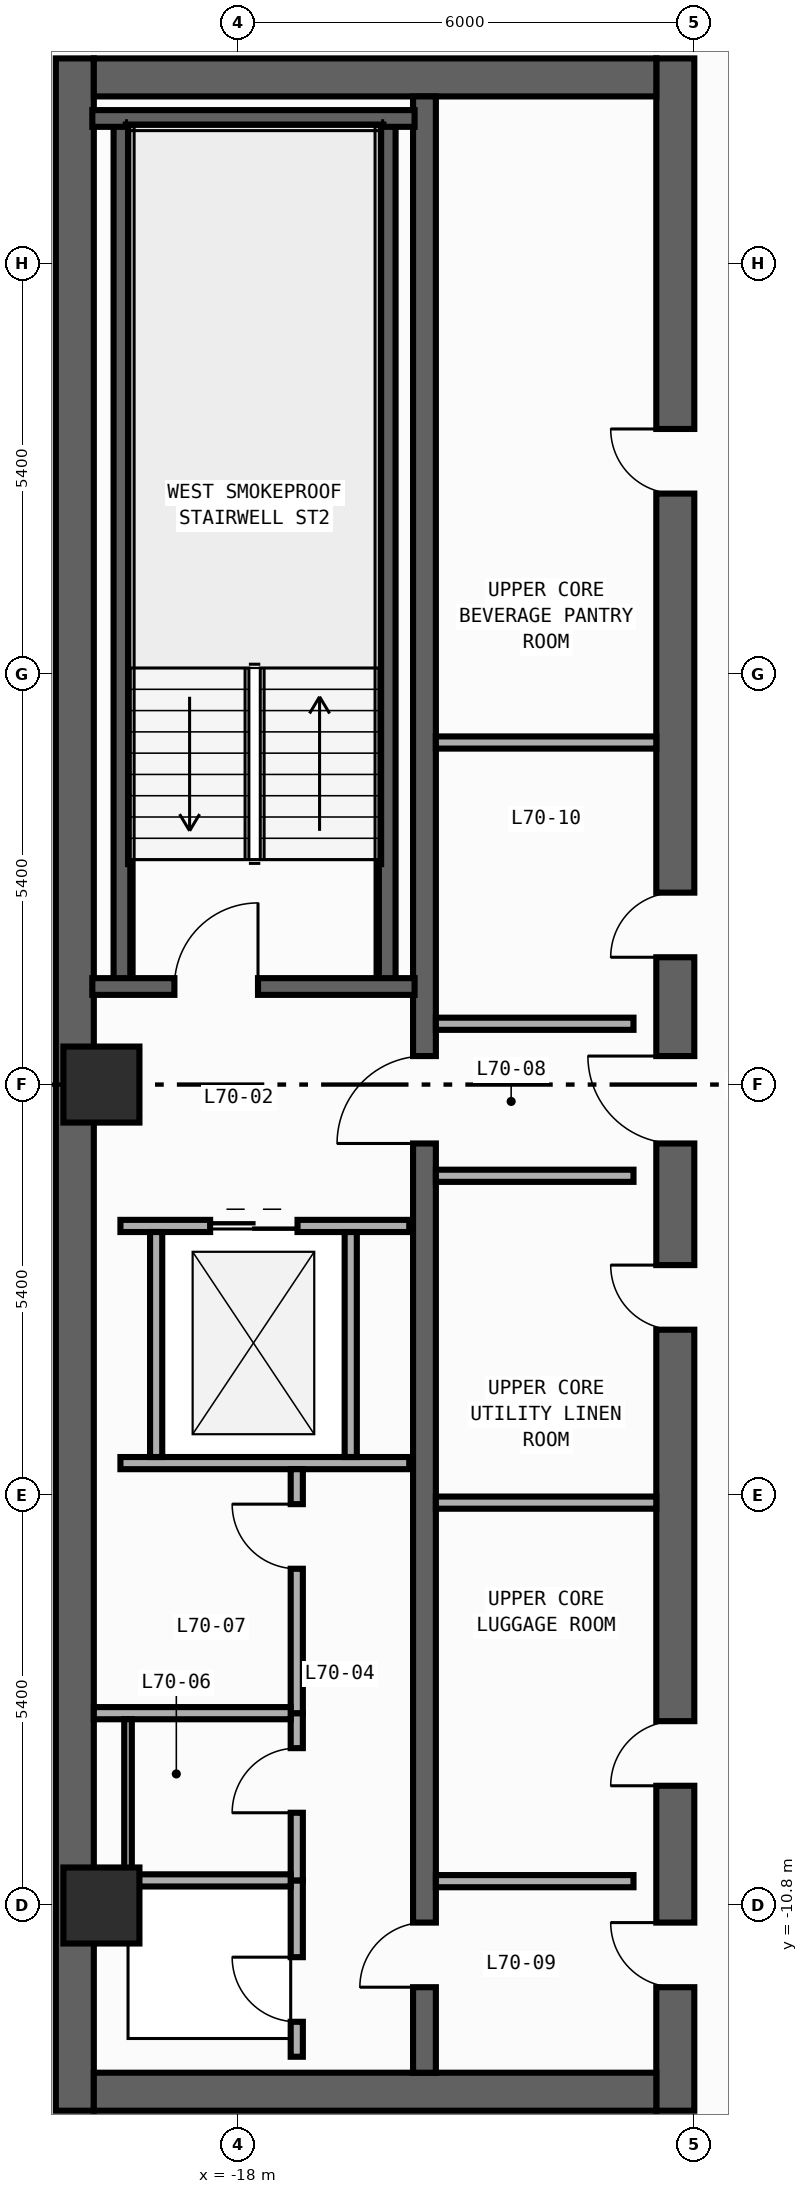
"""IFC4 building model, lengths in metres.
Left out: names, types, materials, properties, quantities, classifications, styles, units other than length and angle.
Written with IfcOpenShell. Run it as: python <this file> out.ifc"""

import sys

from ifc_helpers import new_model, si_unit, direction, frame, frame_2d, origin, origin_2d, place, context, subcontext, project, spatial, rectangle, circle, extrude, element, fill, save


model = new_model("IFC4")
c1 = context("Model", 3, precision=1e-05, world=origin(), true_north=direction((0.0, 1.0)))
c2 = subcontext(c1, "Body", "Model", "MODEL_VIEW")
j1 = project(units=[si_unit("LENGTHUNIT", "METRE"), si_unit("PLANEANGLEUNIT", "RADIAN")], contexts=[c1])
p1 = place(None, origin())
s1 = spatial("IfcSite", under=j1, at=p1, CompositionType="ELEMENT")
p2 = place(p1, origin())
s2 = spatial("IfcBuilding", under=s1, at=p2, CompositionType="ELEMENT")
p3 = place(p2, frame((0.0, 0.0, 292.8)))
s3 = spatial("IfcBuildingStorey", under=s2, at=p3, CompositionType="ELEMENT", Elevation=292.8)
p4 = place(p3, frame((-20.15, -13.5, 0.0), z_axis=(0.0, 0.0, 1.0), x_axis=(0.0, 1.0, 0.0)))
e1 = element("IfcWall", 1, at=p4, inside=s3, PredefinedType="SHEAR", context=c2, shape_type="SweptSolid", body=[
    extrude(rectangle(XDim=27.0, YDim=0.5, at=frame_2d((13.5, 0.0))), origin(), (0.0, 0.0, 1.0), 3.54),
])
p5 = place(p3, frame((-12.25, -13.5, 0.0), z_axis=(0.0, 0.0, 1.0), x_axis=(0.0, 1.0, 0.0)))
e2 = element("IfcWall", 2, at=p5, inside=s3, PredefinedType="SHEAR", context=c2, shape_type="SweptSolid", body=[
    extrude(rectangle(XDim=27.0, YDim=0.5, at=frame_2d((13.5, 0.0))), origin(), (0.0, 0.0, 1.0), 3.54),
])
p6 = place(p5, frame((15.175, 0.0, 0.0)))
e3 = element("IfcOpeningElement", 3, at=p6, cuts=e2, PredefinedType="OPENING", context=c2, shape_type="SweptSolid", body=[
    extrude(rectangle(XDim=0.85, YDim=2.1, at=frame_2d((0.425, 1.05))), frame((0.0, 0.26, 0.0), z_axis=(0.0, -1.0, 0.0), x_axis=(1.0, 0.0, 0.0)), (0.0, 0.0, 1.0), 0.52),
])
p7 = place(p5, frame((21.275, 0.0, 0.0)))
e4 = element("IfcOpeningElement", 4, at=p7, cuts=e2, PredefinedType="OPENING", context=c2, shape_type="SweptSolid", body=[
    extrude(rectangle(XDim=0.85, YDim=2.1, at=frame_2d((0.425, 1.05))), frame((0.0, 0.26, 0.0), z_axis=(0.0, -1.0, 0.0), x_axis=(1.0, 0.0, 0.0)), (0.0, 0.0, 1.0), 0.52),
])
p8 = place(p5, frame((4.275, 0.0, 0.0)))
e5 = element("IfcOpeningElement", 5, at=p8, cuts=e2, PredefinedType="OPENING", context=c2, shape_type="SweptSolid", body=[
    extrude(rectangle(XDim=0.85, YDim=2.1, at=frame_2d((0.425, 1.05))), frame((0.0, 0.26, 0.0), z_axis=(0.0, -1.0, 0.0), x_axis=(1.0, 0.0, 0.0)), (0.0, 0.0, 1.0), 0.52),
])
p9 = place(p5, frame((10.275, 0.0, 0.0)))
e6 = element("IfcOpeningElement", 6, at=p9, cuts=e2, PredefinedType="OPENING", context=c2, shape_type="SweptSolid", body=[
    extrude(rectangle(XDim=0.85, YDim=2.1, at=frame_2d((0.425, 1.05))), frame((0.0, 0.26, 0.0), z_axis=(0.0, -1.0, 0.0), x_axis=(1.0, 0.0, 0.0)), (0.0, 0.0, 1.0), 0.52),
])
p10 = place(p5, frame((12.725, 0.0, 0.0)))
e7 = element("IfcOpeningElement", 7, at=p10, cuts=e2, PredefinedType="OPENING", context=c2, shape_type="SweptSolid", body=[
    extrude(rectangle(XDim=1.15, YDim=2.2, at=frame_2d((0.575, 1.1))), frame((0.0, 0.26, 0.0), z_axis=(0.0, -1.0, 0.0), x_axis=(1.0, 0.0, 0.0)), (0.0, 0.0, 1.0), 0.52),
])
p11 = place(p5, frame((1.625, 0.0, 0.0)))
e8 = element("IfcOpeningElement", 8, at=p11, cuts=e2, PredefinedType="OPENING", context=c2, shape_type="SweptSolid", body=[
    extrude(rectangle(XDim=0.85, YDim=2.1, at=frame_2d((0.425, 1.05))), frame((0.0, 0.26, 0.0), z_axis=(0.0, -1.0, 0.0), x_axis=(1.0, 0.0, 0.0)), (0.0, 0.0, 1.0), 0.52),
])
for number, where, z_axis, x_axis in (
    (9, (-19.9, -13.25, 0.0), (0.0, 0.0, 1.0), (1.0, 0.0, 0.0)),
    (10, (-19.9, 13.25, 0.0), (0.0, 0.0, 1.0), (1.0, 0.0, 0.0)),
):
    element("IfcWall", number, at=place(p3, frame(where, z_axis=z_axis, x_axis=x_axis)), inside=s3, PredefinedType="SHEAR", context=c2, shape_type="SweptSolid", body=[
        extrude(rectangle(XDim=7.4, YDim=0.5, at=frame_2d((3.7, 0.0))), origin(), (0.0, 0.0, 1.0), 3.54),
    ])
p12 = place(p3, frame((-15.55, -13.0, 0.0), z_axis=(0.0, 0.0, 1.0), x_axis=(0.0, 1.0, 0.0)))
e11 = element("IfcWall", 11, at=p12, inside=s3, PredefinedType="SHEAR", context=c2, shape_type="SweptSolid", body=[
    extrude(rectangle(XDim=26.0, YDim=0.3, at=frame_2d((13.0, 0.0))), origin(), (0.0, 0.0, 1.0), 3.54),
])
p13 = place(p12, frame((12.225, 0.0, 0.0)))
e12 = element("IfcOpeningElement", 12, at=p13, cuts=e11, PredefinedType="OPENING", context=c2, shape_type="SweptSolid", body=[
    extrude(rectangle(XDim=1.15, YDim=2.2, at=frame_2d((0.575, 1.1))), frame((0.0, 0.16, 0.0), z_axis=(0.0, -1.0, 0.0), x_axis=(1.0, 0.0, 0.0)), (0.0, 0.0, 1.0), 0.32),
])
p14 = place(p12, frame((1.125, 0.0, 0.0)))
e13 = element("IfcOpeningElement", 13, at=p14, cuts=e11, PredefinedType="OPENING", context=c2, shape_type="SweptSolid", body=[
    extrude(rectangle(XDim=0.85, YDim=2.1, at=frame_2d((0.425, 1.05))), frame((0.0, 0.16, 0.0), z_axis=(0.0, -1.0, 0.0), x_axis=(1.0, 0.0, 0.0)), (0.0, 0.0, 1.0), 0.32),
])
for number, where, z_axis, x_axis in (
    (14, (-16.04, 1.29, 0.0), (0.0, 0.0, 1.0), (0.0, 1.0, 0.0)),
    (15, (-19.53, 1.29, 0.0), (0.0, 0.0, 1.0), (0.0, 1.0, 0.0)),
):
    element("IfcWall", number, at=place(p3, frame(where, z_axis=z_axis, x_axis=x_axis)), inside=s3, PredefinedType="SHEAR", context=c2, shape_type="SweptSolid", body=[
        extrude(rectangle(XDim=11.42, YDim=0.22, at=frame_2d((5.71, 0.0))), origin(), (0.0, 0.0, 1.0), 3.54),
    ])
p15 = place(p3, frame((-19.92, 12.71, 0.0), z_axis=(0.0, 0.0, 1.0), x_axis=(1.0, 0.0, 0.0)))
e16 = element("IfcWall", 16, at=p15, inside=s3, PredefinedType="SHEAR", context=c2, shape_type="SweptSolid", body=[
    extrude(rectangle(XDim=4.24, YDim=0.22, at=frame_2d((2.12, 0.0))), origin(), (0.0, 0.0, 1.0), 3.54),
])
p16 = place(p3, frame((-19.92, 1.29, 0.0), z_axis=(0.0, 0.0, 1.0), x_axis=(1.0, 0.0, 0.0)))
e17 = element("IfcWall", 17, at=p16, inside=s3, PredefinedType="SHEAR", context=c2, shape_type="SweptSolid", body=[
    extrude(rectangle(XDim=4.24, YDim=0.22, at=frame_2d((2.12, 0.0))), origin(), (0.0, 0.0, 1.0), 3.54),
])
p17 = place(p16, frame((1.08, 0.0, 0.0)))
e18 = element("IfcOpeningElement", 18, at=p17, cuts=e17, PredefinedType="OPENING", context=c2, shape_type="SweptSolid", body=[
    extrude(rectangle(XDim=1.1, YDim=2.2, at=frame_2d((0.55, 1.1))), frame((0.0, 0.12, 0.0), z_axis=(0.0, -1.0, 0.0), x_axis=(1.0, 0.0, 0.0)), (0.0, 0.0, 1.0), 0.24),
])
for number, where, z_axis, x_axis in (
    (19, (-19.8, -10.8, 0.0), (0.0, 0.0, 1.0), (1.0, 0.0, 0.0)),
    (20, (-19.8, 0.0, 0.0), (0.0, 0.0, 1.0), (1.0, 0.0, 0.0)),
):
    element("IfcColumn", number, at=place(p3, frame(where, z_axis=z_axis, x_axis=x_axis)), inside=s3, PredefinedType="COLUMN", context=c2, shape_type="SweptSolid", body=[
        extrude(circle(Radius=0.5, at=origin_2d()), origin(), (0.0, 0.0, 1.0), 3.8),
    ])
p18 = place(p3, frame((-19.55, -1.86, 0.0), z_axis=(0.0, 0.0, 1.0), x_axis=(1.0, 0.0, 0.0)))
e21 = element("IfcWall", 21, at=p18, inside=s3, PredefinedType="STANDARD", context=c2, shape_type="SweptSolid", body=[
    extrude(rectangle(XDim=3.8, YDim=0.16, at=frame_2d((1.9, 0.0))), origin(), (0.0, 0.0, 1.0), 3.54),
])
p19 = place(p18, frame((1.18, 0.0, 0.0)))
e22 = element("IfcOpeningElement", 22, at=p19, cuts=e21, PredefinedType="OPENING", context=c2, shape_type="SweptSolid", body=[
    extrude(rectangle(XDim=1.15, YDim=2.2, at=frame_2d((0.575, 1.1))), frame((0.0, 0.09, 0.0), z_axis=(0.0, -1.0, 0.0), x_axis=(1.0, 0.0, 0.0)), (0.0, 0.0, 1.0), 0.18),
])
p20 = place(p3, frame((-19.55, -4.98, 0.0), z_axis=(0.0, 0.0, 1.0), x_axis=(1.0, 0.0, 0.0)))
e23 = element("IfcWall", 23, at=p20, inside=s3, PredefinedType="STANDARD", context=c2, shape_type="SweptSolid", body=[
    extrude(rectangle(XDim=3.8, YDim=0.16, at=frame_2d((1.9, 0.0))), origin(), (0.0, 0.0, 1.0), 3.54),
])
for number, where, z_axis, x_axis in (
    (24, (-19.08, -4.9, 0.0), (0.0, 0.0, 1.0), (0.0, 1.0, 0.0)),
    (25, (-16.52, -4.9, 0.0), (0.0, 0.0, 1.0), (0.0, 1.0, 0.0)),
):
    element("IfcWall", number, at=place(p3, frame(where, z_axis=z_axis, x_axis=x_axis)), inside=s3, PredefinedType="STANDARD", context=c2, shape_type="SweptSolid", body=[
        extrude(rectangle(XDim=2.96, YDim=0.16, at=frame_2d((1.48, 0.0))), origin(), (0.0, 0.0, 1.0), 3.54),
    ])
for number, where, z_axis, x_axis in (
    (26, (-15.4, 0.8, 0.0), (0.0, 0.0, 1.0), (1.0, 0.0, 0.0)),
    (27, (-15.4, -1.2, 0.0), (0.0, 0.0, 1.0), (1.0, 0.0, 0.0)),
    (28, (-15.4, -10.48, 0.0), (0.0, 0.0, 1.0), (1.0, 0.0, 0.0)),
):
    element("IfcWall", number, at=place(p3, frame(where, z_axis=z_axis, x_axis=x_axis)), inside=s3, PredefinedType="STANDARD", context=c2, shape_type="SweptSolid", body=[
        extrude(rectangle(XDim=2.6, YDim=0.16, at=frame_2d((1.3, 0.0))), origin(), (0.0, 0.0, 1.0), 3.54),
    ])
p21 = place(p3, frame((-17.23, -12.79, 0.0), z_axis=(0.0, 0.0, 1.0), x_axis=(0.0, 1.0, 0.0)))
e29 = element("IfcWall", 29, at=p21, inside=s3, PredefinedType="PARTITIONING", context=c2, shape_type="SweptSolid", body=[
    extrude(rectangle(XDim=2.32, YDim=0.16, at=frame_2d((1.16, 0.0))), origin(), (0.0, 0.0, 1.0), 3.54),
])
p22 = place(p21, frame((0.46, 0.0, 0.0)))
e30 = element("IfcOpeningElement", 30, at=p22, cuts=e29, PredefinedType="OPENING", context=c2, shape_type="SweptSolid", body=[
    extrude(rectangle(XDim=0.85, YDim=2.1, at=frame_2d((0.425, 1.05))), frame((0.0, 0.09, 0.0), z_axis=(0.0, -1.0, 0.0), x_axis=(1.0, 0.0, 0.0)), (0.0, 0.0, 1.0), 0.18),
])
p23 = place(p3, frame((-17.23, -10.47, 0.0), z_axis=(0.0, 0.0, 1.0), x_axis=(0.0, 1.0, 0.0)))
e31 = element("IfcWall", 31, at=p23, inside=s3, PredefinedType="PARTITIONING", context=c2, shape_type="SweptSolid", body=[
    extrude(rectangle(XDim=2.2, YDim=0.16, at=frame_2d((1.1, 0.0))), origin(), (0.0, 0.0, 1.0), 3.54),
])
p24 = place(p23, frame((0.89, 0.0, 0.0)))
e32 = element("IfcOpeningElement", 32, at=p24, cuts=e31, PredefinedType="OPENING", context=c2, shape_type="SweptSolid", body=[
    extrude(rectangle(XDim=0.85, YDim=2.1, at=frame_2d((0.425, 1.05))), frame((0.0, 0.09, 0.0), z_axis=(0.0, -1.0, 0.0), x_axis=(1.0, 0.0, 0.0)), (0.0, 0.0, 1.0), 0.18),
])
p25 = place(p3, frame((-17.23, -8.27, 0.0), z_axis=(0.0, 0.0, 1.0), x_axis=(0.0, 1.0, 0.0)))
e33 = element("IfcWall", 33, at=p25, inside=s3, PredefinedType="PARTITIONING", context=c2, shape_type="SweptSolid", body=[
    extrude(rectangle(XDim=3.21, YDim=0.16, at=frame_2d((1.605, 0.0))), origin(), (0.0, 0.0, 1.0), 3.54),
])
p26 = place(p25, frame((1.9, 0.0, 0.0)))
e34 = element("IfcOpeningElement", 34, at=p26, cuts=e33, PredefinedType="OPENING", context=c2, shape_type="SweptSolid", body=[
    extrude(rectangle(XDim=0.85, YDim=2.1, at=frame_2d((0.425, 1.05))), frame((0.0, 0.09, 0.0), z_axis=(0.0, -1.0, 0.0), x_axis=(1.0, 0.0, 0.0)), (0.0, 0.0, 1.0), 0.18),
])
p27 = place(p3, frame((-19.75, -10.47, 0.0), z_axis=(0.0, 0.0, 1.0), x_axis=(1.0, 0.0, 0.0)))
e35 = element("IfcWall", 35, at=p27, inside=s3, PredefinedType="PARTITIONING", context=c2, shape_type="SweptSolid", body=[
    extrude(rectangle(XDim=2.44, YDim=0.16, at=frame_2d((1.22, 0.0))), origin(), (0.0, 0.0, 1.0), 3.54),
])
p28 = place(p3, frame((-19.9, -8.27, 0.0), z_axis=(0.0, 0.0, 1.0), x_axis=(1.0, 0.0, 0.0)))
e36 = element("IfcWall", 36, at=p28, inside=s3, PredefinedType="PARTITIONING", context=c2, shape_type="SweptSolid", body=[
    extrude(rectangle(XDim=2.59, YDim=0.16, at=frame_2d((1.295, 0.0))), origin(), (0.0, 0.0, 1.0), 3.54),
])
for number, where, z_axis, x_axis in (
    (37, (-15.4, 4.5, 0.0), (0.0, 0.0, 1.0), (1.0, 0.0, 0.0)),
    (38, (-15.4, -5.5, 0.0), (0.0, 0.0, 1.0), (1.0, 0.0, 0.0)),
):
    element("IfcWall", number, at=place(p3, frame(where, z_axis=z_axis, x_axis=x_axis)), inside=s3, PredefinedType="PARTITIONING", context=c2, shape_type="SweptSolid", body=[
        extrude(rectangle(XDim=2.9, YDim=0.16, at=frame_2d((1.45, 0.0))), origin(), (0.0, 0.0, 1.0), 3.54),
    ])
p29 = place(p3, frame((-19.45, -10.39, 0.0), z_axis=(0.0, 0.0, 1.0), x_axis=(0.0, 1.0, 0.0)))
e39 = element("IfcWall", 39, at=p29, inside=s3, PredefinedType="PARTITIONING", context=c2, shape_type="SweptSolid", body=[
    extrude(rectangle(XDim=2.04, YDim=0.1, at=frame_2d((1.02, 0.0))), origin(), (0.0, 0.0, 1.0), 3.54),
])
p30 = place(p17, origin())
e40 = element("IfcDoor", 40, at=p30, inside=s3, OperationType="SINGLE_SWING_RIGHT", PredefinedType="DOOR", context=c2, shape_type="SweptSolid", body=[
    extrude(rectangle(XDim=1.1, YDim=2.2, at=frame_2d((0.55, 1.1))), frame((0.0, 0.025, 0.0), z_axis=(0.0, -1.0, 0.0), x_axis=(1.0, 0.0, 0.0)), (0.0, 0.0, 1.0), 0.05),
])
fill(e18, e40)
p31 = place(p6, origin())
e41 = element("IfcDoor", 41, at=p31, inside=s3, OperationType="SINGLE_SWING_LEFT", PredefinedType="DOOR", context=c2, shape_type="SweptSolid", body=[
    extrude(rectangle(XDim=0.85, YDim=2.1, at=frame_2d((0.425, 1.05))), frame((0.0, 0.025, 0.0), z_axis=(0.0, -1.0, 0.0), x_axis=(1.0, 0.0, 0.0)), (0.0, 0.0, 1.0), 0.05),
])
fill(e3, e41)
p32 = place(p7, origin())
e42 = element("IfcDoor", 42, at=p32, inside=s3, OperationType="SINGLE_SWING_RIGHT", PredefinedType="DOOR", context=c2, shape_type="SweptSolid", body=[
    extrude(rectangle(XDim=0.85, YDim=2.1, at=frame_2d((0.425, 1.05))), frame((0.0, 0.025, 0.0), z_axis=(0.0, -1.0, 0.0), x_axis=(1.0, 0.0, 0.0)), (0.0, 0.0, 1.0), 0.05),
])
fill(e4, e42)
p33 = place(p8, origin())
e43 = element("IfcDoor", 43, at=p33, inside=s3, OperationType="SINGLE_SWING_LEFT", PredefinedType="DOOR", context=c2, shape_type="SweptSolid", body=[
    extrude(rectangle(XDim=0.85, YDim=2.1, at=frame_2d((0.425, 1.05))), frame((0.0, 0.025, 0.0), z_axis=(0.0, -1.0, 0.0), x_axis=(1.0, 0.0, 0.0)), (0.0, 0.0, 1.0), 0.05),
])
fill(e5, e43)
p34 = place(p9, origin())
e44 = element("IfcDoor", 44, at=p34, inside=s3, OperationType="SINGLE_SWING_RIGHT", PredefinedType="DOOR", context=c2, shape_type="SweptSolid", body=[
    extrude(rectangle(XDim=0.85, YDim=2.1, at=frame_2d((0.425, 1.05))), frame((0.0, 0.025, 0.0), z_axis=(0.0, -1.0, 0.0), x_axis=(1.0, 0.0, 0.0)), (0.0, 0.0, 1.0), 0.05),
])
fill(e6, e44)
p35 = place(p10, origin())
e45 = element("IfcDoor", 45, at=p35, inside=s3, OperationType="SINGLE_SWING_RIGHT", PredefinedType="DOOR", context=c2, shape_type="SweptSolid", body=[
    extrude(rectangle(XDim=1.15, YDim=2.2, at=frame_2d((0.575, 1.1))), frame((0.0, 0.025, 0.0), z_axis=(0.0, -1.0, 0.0), x_axis=(1.0, 0.0, 0.0)), (0.0, 0.0, 1.0), 0.05),
])
fill(e7, e45)
p36 = place(p13, origin())
e46 = element("IfcDoor", 46, at=p36, inside=s3, OperationType="SINGLE_SWING_LEFT", PredefinedType="DOOR", context=c2, shape_type="SweptSolid", body=[
    extrude(rectangle(XDim=1.15, YDim=2.2, at=frame_2d((0.575, 1.1))), frame((0.0, 0.025, 0.0), z_axis=(0.0, -1.0, 0.0), x_axis=(1.0, 0.0, 0.0)), (0.0, 0.0, 1.0), 0.05),
])
fill(e12, e46)
p37 = place(p11, origin())
e47 = element("IfcDoor", 47, at=p37, inside=s3, OperationType="SINGLE_SWING_RIGHT", PredefinedType="DOOR", context=c2, shape_type="SweptSolid", body=[
    extrude(rectangle(XDim=0.85, YDim=2.1, at=frame_2d((0.425, 1.05))), frame((0.0, 0.025, 0.0), z_axis=(0.0, -1.0, 0.0), x_axis=(1.0, 0.0, 0.0)), (0.0, 0.0, 1.0), 0.05),
])
fill(e8, e47)
p38 = place(p14, origin())
e48 = element("IfcDoor", 48, at=p38, inside=s3, OperationType="SINGLE_SWING_LEFT", PredefinedType="DOOR", context=c2, shape_type="SweptSolid", body=[
    extrude(rectangle(XDim=0.85, YDim=2.1, at=frame_2d((0.425, 1.05))), frame((0.0, 0.025, 0.0), z_axis=(0.0, -1.0, 0.0), x_axis=(1.0, 0.0, 0.0)), (0.0, 0.0, 1.0), 0.05),
])
fill(e13, e48)
p39 = place(p19, origin())
e49 = element("IfcDoor", 49, at=p39, inside=s3, OperationType="DOUBLE_DOOR_SLIDING", PredefinedType="DOOR", context=c2, shape_type="SweptSolid", body=[
    extrude(rectangle(XDim=1.15, YDim=2.2, at=frame_2d((0.575, 1.1))), frame((0.0, 0.025, 0.0), z_axis=(0.0, -1.0, 0.0), x_axis=(1.0, 0.0, 0.0)), (0.0, 0.0, 1.0), 0.05),
])
fill(e22, e49)
p40 = place(p22, origin())
e50 = element("IfcDoor", 50, at=p40, inside=s3, OperationType="SINGLE_SWING_RIGHT", PredefinedType="DOOR", context=c2, shape_type="SweptSolid", body=[
    extrude(rectangle(XDim=0.85, YDim=2.1, at=frame_2d((0.425, 1.05))), frame((0.0, 0.025, 0.0), z_axis=(0.0, -1.0, 0.0), x_axis=(1.0, 0.0, 0.0)), (0.0, 0.0, 1.0), 0.05),
])
fill(e30, e50)
p41 = place(p24, origin())
e51 = element("IfcDoor", 51, at=p41, inside=s3, OperationType="SINGLE_SWING_LEFT", PredefinedType="DOOR", context=c2, shape_type="SweptSolid", body=[
    extrude(rectangle(XDim=0.85, YDim=2.1, at=frame_2d((0.425, 1.05))), frame((0.0, 0.025, 0.0), z_axis=(0.0, -1.0, 0.0), x_axis=(1.0, 0.0, 0.0)), (0.0, 0.0, 1.0), 0.05),
])
fill(e32, e51)
p42 = place(p26, origin())
e52 = element("IfcDoor", 52, at=p42, inside=s3, OperationType="SINGLE_SWING_RIGHT", PredefinedType="DOOR", context=c2, shape_type="SweptSolid", body=[
    extrude(rectangle(XDim=0.85, YDim=2.1, at=frame_2d((0.425, 1.05))), frame((0.0, 0.025, 0.0), z_axis=(0.0, -1.0, 0.0), x_axis=(1.0, 0.0, 0.0)), (0.0, 0.0, 1.0), 0.05),
])
fill(e34, e52)
save(model, sys.argv[1])
